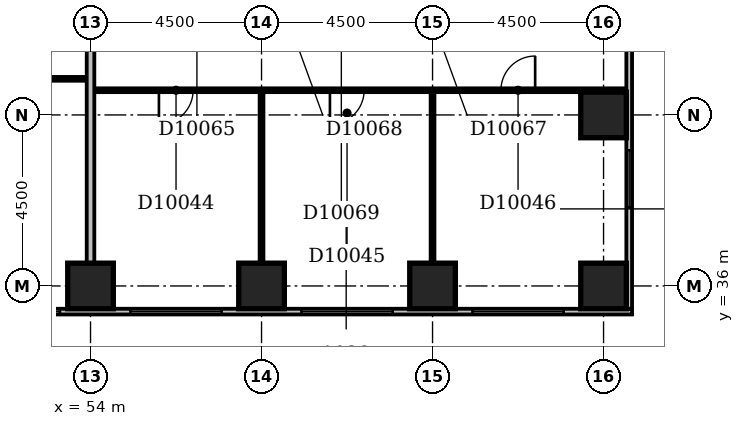
"""IFC4 building model, lengths in metres.
Left out: names, types, materials, properties, quantities, classifications, styles, units other than length and angle.
Written with IfcOpenShell. Run it as: python <this file> out.ifc"""

import sys

from ifc_helpers import new_model, si_unit, direction, frame, frame_2d, origin, origin_2d, place, context, subcontext, project, spatial, rectangle, extrude, element, fill, save


model = new_model("IFC4")
c1 = context("Model", 3, precision=1e-05, world=origin(), true_north=direction((0.0, 1.0)))
c2 = subcontext(c1, "Body", "Model", "MODEL_VIEW")
j1 = project(units=[si_unit("LENGTHUNIT", "METRE"), si_unit("PLANEANGLEUNIT", "RADIAN")], contexts=[c1])
p1 = place(None, origin())
s1 = spatial("IfcSite", under=j1, at=p1, CompositionType="ELEMENT")
p2 = place(p1, origin())
s2 = spatial("IfcBuilding", under=s1, at=p2, CompositionType="ELEMENT")
p3 = place(p2, frame((0.0, 0.0, 47.0)))
s3 = spatial("IfcBuildingStorey", under=s2, at=p3, CompositionType="ELEMENT", Elevation=47.0)
for number, where, z_axis, x_axis in (
    (1, (54.0, 36.0, -0.3), (0.0, 0.0, 1.0), (1.0, 0.0, 0.0)),
    (2, (58.5, 36.0, -0.3), (0.0, 0.0, 1.0), (1.0, 0.0, 0.0)),
    (3, (63.0, 36.0, -0.3), (0.0, 0.0, 1.0), (1.0, 0.0, 0.0)),
    (4, (67.5, 36.0, -0.3), (0.0, 0.0, 1.0), (1.0, 0.0, 0.0)),
    (5, (67.5, 40.5, -0.3), (0.0, 0.0, 1.0), (1.0, 0.0, 0.0)),
):
    element("IfcColumn", number, at=place(p3, frame(where, z_axis=z_axis, x_axis=x_axis)), inside=s3, PredefinedType="COLUMN", context=c2, shape_type="SweptSolid", body=[
        extrude(rectangle(XDim=1.2, YDim=1.2, at=origin_2d()), origin(), (0.0, 0.0, 1.0), 3.6),
    ])
p4 = place(p3, frame((23.1, 35.325, 0.0), z_axis=(0.0, 0.0, 1.0), x_axis=(1.0, 0.0, 0.0)))
e6 = element("IfcWall", 6, at=p4, inside=s3, PredefinedType="STANDARD", context=c2, shape_type="SweptSolid", body=[
    extrude(rectangle(XDim=45.15, YDim=0.15, at=frame_2d((22.575, 0.0))), origin(), (0.0, 0.0, 1.0), 2.7),
])
p5 = place(p4, frame((2.386, 0.0, 0.6)))
e7 = element("IfcOpeningElement", 7, at=p5, cuts=e6, PredefinedType="OPENING", context=c2, shape_type="SweptSolid", body=[
    extrude(rectangle(XDim=0.6, YDim=1.8, at=frame_2d((0.3, 0.9))), frame((0.0, 0.087, 0.0), z_axis=(0.0, -1.0, 0.0), x_axis=(1.0, 0.0, 0.0)), (0.0, 0.0, 1.0), 0.174),
])
p6 = place(p4, frame((4.95, 0.0, 0.6)))
e8 = element("IfcOpeningElement", 8, at=p6, cuts=e6, PredefinedType="OPENING", context=c2, shape_type="SweptSolid", body=[
    extrude(rectangle(XDim=2.4, YDim=1.8, at=frame_2d((1.2, 0.9))), frame((0.0, 0.087, 0.0), z_axis=(0.0, -1.0, 0.0), x_axis=(1.0, 0.0, 0.0)), (0.0, 0.0, 1.0), 0.174),
])
p7 = place(p4, frame((9.45, 0.0, 0.6)))
e9 = element("IfcOpeningElement", 9, at=p7, cuts=e6, PredefinedType="OPENING", context=c2, shape_type="SweptSolid", body=[
    extrude(rectangle(XDim=2.4, YDim=1.8, at=frame_2d((1.2, 0.9))), frame((0.0, 0.087, 0.0), z_axis=(0.0, -1.0, 0.0), x_axis=(1.0, 0.0, 0.0)), (0.0, 0.0, 1.0), 0.174),
])
p8 = place(p4, frame((13.95, 0.0, 0.6)))
e10 = element("IfcOpeningElement", 10, at=p8, cuts=e6, PredefinedType="OPENING", context=c2, shape_type="SweptSolid", body=[
    extrude(rectangle(XDim=2.4, YDim=1.8, at=frame_2d((1.2, 0.9))), frame((0.0, 0.087, 0.0), z_axis=(0.0, -1.0, 0.0), x_axis=(1.0, 0.0, 0.0)), (0.0, 0.0, 1.0), 0.174),
])
p9 = place(p4, frame((18.45, 0.0, 0.6)))
e11 = element("IfcOpeningElement", 11, at=p9, cuts=e6, PredefinedType="OPENING", context=c2, shape_type="SweptSolid", body=[
    extrude(rectangle(XDim=2.4, YDim=1.8, at=frame_2d((1.2, 0.9))), frame((0.0, 0.087, 0.0), z_axis=(0.0, -1.0, 0.0), x_axis=(1.0, 0.0, 0.0)), (0.0, 0.0, 1.0), 0.174),
])
p10 = place(p4, frame((22.83, 0.0, 0.6)))
e12 = element("IfcOpeningElement", 12, at=p10, cuts=e6, PredefinedType="OPENING", context=c2, shape_type="SweptSolid", body=[
    extrude(rectangle(XDim=1.5, YDim=1.8, at=frame_2d((0.75, 0.9))), frame((0.0, 0.087, 0.0), z_axis=(0.0, -1.0, 0.0), x_axis=(1.0, 0.0, 0.0)), (0.0, 0.0, 1.0), 0.174),
])
p11 = place(p4, frame((28.894, 0.0, 0.6)))
e13 = element("IfcOpeningElement", 13, at=p11, cuts=e6, PredefinedType="OPENING", context=c2, shape_type="SweptSolid", body=[
    extrude(rectangle(XDim=1.2, YDim=1.8, at=frame_2d((0.6, 0.9))), frame((0.0, 0.087, 0.0), z_axis=(0.0, -1.0, 0.0), x_axis=(1.0, 0.0, 0.0)), (0.0, 0.0, 1.0), 0.174),
])
p12 = place(p4, frame((31.95, 0.0, 0.6)))
e14 = element("IfcOpeningElement", 14, at=p12, cuts=e6, PredefinedType="OPENING", context=c2, shape_type="SweptSolid", body=[
    extrude(rectangle(XDim=2.4, YDim=1.8, at=frame_2d((1.2, 0.9))), frame((0.0, 0.087, 0.0), z_axis=(0.0, -1.0, 0.0), x_axis=(1.0, 0.0, 0.0)), (0.0, 0.0, 1.0), 0.174),
])
p13 = place(p4, frame((36.45, 0.0, 0.6)))
e15 = element("IfcOpeningElement", 15, at=p13, cuts=e6, PredefinedType="OPENING", context=c2, shape_type="SweptSolid", body=[
    extrude(rectangle(XDim=2.4, YDim=1.8, at=frame_2d((1.2, 0.9))), frame((0.0, 0.087, 0.0), z_axis=(0.0, -1.0, 0.0), x_axis=(1.0, 0.0, 0.0)), (0.0, 0.0, 1.0), 0.174),
])
p14 = place(p4, frame((40.95, 0.0, 0.6)))
e16 = element("IfcOpeningElement", 16, at=p14, cuts=e6, PredefinedType="OPENING", context=c2, shape_type="SweptSolid", body=[
    extrude(rectangle(XDim=2.4, YDim=1.8, at=frame_2d((1.2, 0.9))), frame((0.0, 0.087, 0.0), z_axis=(0.0, -1.0, 0.0), x_axis=(1.0, 0.0, 0.0)), (0.0, 0.0, 1.0), 0.174),
])
p15 = place(p3, frame((68.175, 35.4, 0.0), z_axis=(0.0, 0.0, 1.0), x_axis=(0.0, 1.0, 0.0)))
e17 = element("IfcWall", 17, at=p15, inside=s3, PredefinedType="STANDARD", context=c2, shape_type="SweptSolid", body=[
    extrude(rectangle(XDim=23.85, YDim=0.15, at=frame_2d((11.925, 0.0))), origin(), (0.0, 0.0, 1.0), 2.7),
])
p16 = place(p15, frame((2.67, 0.0, 0.6)))
e18 = element("IfcOpeningElement", 18, at=p16, cuts=e17, PredefinedType="OPENING", context=c2, shape_type="SweptSolid", body=[
    extrude(rectangle(XDim=1.5, YDim=1.8, at=frame_2d((0.75, 0.9))), frame((0.0, 0.087, 0.0), z_axis=(0.0, -1.0, 0.0), x_axis=(1.0, 0.0, 0.0)), (0.0, 0.0, 1.0), 0.174),
])
p17 = place(p15, frame((10.65, 0.0, 0.6)))
e19 = element("IfcOpeningElement", 19, at=p17, cuts=e17, PredefinedType="OPENING", context=c2, shape_type="SweptSolid", body=[
    extrude(rectangle(XDim=2.4, YDim=1.8, at=frame_2d((1.2, 0.9))), frame((0.0, 0.087, 0.0), z_axis=(0.0, -1.0, 0.0), x_axis=(1.0, 0.0, 0.0)), (0.0, 0.0, 1.0), 0.174),
])
p18 = place(p15, frame((19.5, 0.0, 0.6)))
e20 = element("IfcOpeningElement", 20, at=p18, cuts=e17, PredefinedType="OPENING", context=c2, shape_type="SweptSolid", body=[
    extrude(rectangle(XDim=2.1, YDim=1.8, at=frame_2d((1.05, 0.9))), frame((0.0, 0.087, 0.0), z_axis=(0.0, -1.0, 0.0), x_axis=(1.0, 0.0, 0.0)), (0.0, 0.0, 1.0), 0.174),
])
p19 = place(p3, frame((54.0, 36.6, 0.0), z_axis=(0.0, 0.0, 1.0), x_axis=(0.0, 1.0, 0.0)))
e21 = element("IfcWall", 21, at=p19, inside=s3, PredefinedType="PARTITIONING", context=c2, shape_type="SweptSolid", body=[
    extrude(rectangle(XDim=12.8, YDim=0.2, at=frame_2d((6.4, 0.0))), origin(), (0.0, 0.0, 1.0), 2.6),
])
p20 = place(p3, frame((58.5, 36.6, 0.0), z_axis=(0.0, 0.0, 1.0), x_axis=(0.0, 1.0, 0.0)))
e22 = element("IfcWall", 22, at=p20, inside=s3, PredefinedType="PARTITIONING", context=c2, shape_type="SweptSolid", body=[
    extrude(rectangle(XDim=4.5, YDim=0.1, at=frame_2d((2.25, 0.0))), origin(), (0.0, 0.0, 1.0), 3.3),
])
p21 = place(p3, frame((63.0, 36.6, 0.0), z_axis=(0.0, 0.0, 1.0), x_axis=(0.0, 1.0, 0.0)))
e23 = element("IfcWall", 23, at=p21, inside=s3, PredefinedType="PARTITIONING", context=c2, shape_type="SweptSolid", body=[
    extrude(rectangle(XDim=4.5, YDim=0.1, at=frame_2d((2.25, 0.0))), origin(), (0.0, 0.0, 1.0), 2.4),
])
p22 = place(p3, frame((54.1, 41.15, 0.0), z_axis=(0.0, 0.0, 1.0), x_axis=(1.0, 0.0, 0.0)))
e24 = element("IfcWall", 24, at=p22, inside=s3, PredefinedType="PARTITIONING", context=c2, shape_type="SweptSolid", body=[
    extrude(rectangle(XDim=14.0, YDim=0.1, at=frame_2d((7.0, 0.0))), origin(), (0.0, 0.0, 1.0), 3.3),
])
p23 = place(p22, frame((1.7, 0.0, 0.0)))
e25 = element("IfcOpeningElement", 25, at=p23, cuts=e24, PredefinedType="OPENING", context=c2, shape_type="SweptSolid", body=[
    extrude(rectangle(XDim=0.9, YDim=2.1, at=frame_2d((0.45, 1.05))), frame((0.0, 0.062, 0.0), z_axis=(0.0, -1.0, 0.0), x_axis=(1.0, 0.0, 0.0)), (0.0, 0.0, 1.0), 0.124),
])
p24 = place(p22, frame((6.2, 0.0, 0.0)))
e26 = element("IfcOpeningElement", 26, at=p24, cuts=e24, PredefinedType="OPENING", context=c2, shape_type="SweptSolid", body=[
    extrude(rectangle(XDim=0.9, YDim=2.1, at=frame_2d((0.45, 1.05))), frame((0.0, 0.062, 0.0), z_axis=(0.0, -1.0, 0.0), x_axis=(1.0, 0.0, 0.0)), (0.0, 0.0, 1.0), 0.124),
])
p25 = place(p22, frame((10.7, 0.0, 0.0)))
e27 = element("IfcOpeningElement", 27, at=p25, cuts=e24, PredefinedType="OPENING", context=c2, shape_type="SweptSolid", body=[
    extrude(rectangle(XDim=0.9, YDim=2.1, at=frame_2d((0.45, 1.05))), frame((0.0, 0.062, 0.0), z_axis=(0.0, -1.0, 0.0), x_axis=(1.0, 0.0, 0.0)), (0.0, 0.0, 1.0), 0.124),
])
p26 = place(p3, frame((40.6, 41.45, 0.0), z_axis=(0.0, 0.0, 1.0), x_axis=(1.0, 0.0, 0.0)))
e28 = element("IfcWall", 28, at=p26, inside=s3, PredefinedType="PARTITIONING", context=c2, shape_type="SweptSolid", body=[
    extrude(rectangle(XDim=13.3, YDim=0.1, at=frame_2d((6.65, 0.0))), origin(), (0.0, 0.0, 1.0), 3.3),
])
p27 = place(p26, frame((1.7, 0.0, 0.0)))
e29 = element("IfcOpeningElement", 29, at=p27, cuts=e28, PredefinedType="OPENING", context=c2, shape_type="SweptSolid", body=[
    extrude(rectangle(XDim=0.9, YDim=2.1, at=frame_2d((0.45, 1.05))), frame((0.0, 0.062, 0.0), z_axis=(0.0, -1.0, 0.0), x_axis=(1.0, 0.0, 0.0)), (0.0, 0.0, 1.0), 0.124),
])
p28 = place(p26, frame((6.2, 0.0, 0.0)))
e30 = element("IfcOpeningElement", 30, at=p28, cuts=e28, PredefinedType="OPENING", context=c2, shape_type="SweptSolid", body=[
    extrude(rectangle(XDim=0.9, YDim=2.1, at=frame_2d((0.45, 1.05))), frame((0.0, 0.062, 0.0), z_axis=(0.0, -1.0, 0.0), x_axis=(1.0, 0.0, 0.0)), (0.0, 0.0, 1.0), 0.124),
])
p29 = place(p26, frame((10.7, 0.0, 0.0)))
e31 = element("IfcOpeningElement", 31, at=p29, cuts=e28, PredefinedType="OPENING", context=c2, shape_type="SweptSolid", body=[
    extrude(rectangle(XDim=0.9, YDim=2.1, at=frame_2d((0.45, 1.05))), frame((0.0, 0.062, 0.0), z_axis=(0.0, -1.0, 0.0), x_axis=(1.0, 0.0, 0.0)), (0.0, 0.0, 1.0), 0.124),
])
p30 = place(p11, origin())
e32 = element("IfcWindow", 32, at=p30, inside=s3, PartitioningType="SINGLE_PANEL", PredefinedType="WINDOW", context=c2, shape_type="SweptSolid", body=[
    extrude(rectangle(XDim=1.2, YDim=1.8, at=frame_2d((0.6, 0.9))), frame((0.0, 0.03, 0.0), z_axis=(0.0, -1.0, 0.0), x_axis=(1.0, 0.0, 0.0)), (0.0, 0.0, 1.0), 0.06),
])
fill(e13, e32)
p31 = place(p12, origin())
e33 = element("IfcWindow", 33, at=p31, inside=s3, PartitioningType="SINGLE_PANEL", PredefinedType="WINDOW", context=c2, shape_type="SweptSolid", body=[
    extrude(rectangle(XDim=2.4, YDim=1.8, at=frame_2d((1.2, 0.9))), frame((0.0, 0.03, 0.0), z_axis=(0.0, -1.0, 0.0), x_axis=(1.0, 0.0, 0.0)), (0.0, 0.0, 1.0), 0.06),
])
fill(e14, e33)
p32 = place(p13, origin())
e34 = element("IfcWindow", 34, at=p32, inside=s3, PartitioningType="SINGLE_PANEL", PredefinedType="WINDOW", context=c2, shape_type="SweptSolid", body=[
    extrude(rectangle(XDim=2.4, YDim=1.8, at=frame_2d((1.2, 0.9))), frame((0.0, 0.03, 0.0), z_axis=(0.0, -1.0, 0.0), x_axis=(1.0, 0.0, 0.0)), (0.0, 0.0, 1.0), 0.06),
])
fill(e15, e34)
p33 = place(p14, origin())
e35 = element("IfcWindow", 35, at=p33, inside=s3, PartitioningType="SINGLE_PANEL", PredefinedType="WINDOW", context=c2, shape_type="SweptSolid", body=[
    extrude(rectangle(XDim=2.4, YDim=1.8, at=frame_2d((1.2, 0.9))), frame((0.0, 0.03, 0.0), z_axis=(0.0, -1.0, 0.0), x_axis=(1.0, 0.0, 0.0)), (0.0, 0.0, 1.0), 0.06),
])
fill(e16, e35)
p34 = place(p16, origin())
e36 = element("IfcWindow", 36, at=p34, inside=s3, PartitioningType="SINGLE_PANEL", PredefinedType="WINDOW", context=c2, shape_type="SweptSolid", body=[
    extrude(rectangle(XDim=1.5, YDim=1.8, at=frame_2d((0.75, 0.9))), frame((0.0, 0.03, 0.0), z_axis=(0.0, -1.0, 0.0), x_axis=(1.0, 0.0, 0.0)), (0.0, 0.0, 1.0), 0.06),
])
fill(e18, e36)
p35 = place(p23, frame((0.9, 0.0, 0.0), z_axis=(0.0, 0.0, 1.0), x_axis=(-1.0, 0.0, 0.0)))
e37 = element("IfcDoor", 37, at=p35, inside=s3, OperationType="SINGLE_SWING_RIGHT", PredefinedType="DOOR", context=c2, shape_type="SweptSolid", body=[
    extrude(rectangle(XDim=0.9, YDim=2.1, at=frame_2d((0.45, 1.05))), frame((0.0, 0.025, 0.0), z_axis=(0.0, -1.0, 0.0), x_axis=(1.0, 0.0, 0.0)), (0.0, 0.0, 1.0), 0.05),
])
fill(e25, e37)
p36 = place(p24, frame((0.9, 0.0, 0.0), z_axis=(0.0, 0.0, 1.0), x_axis=(-1.0, 0.0, 0.0)))
e38 = element("IfcDoor", 38, at=p36, inside=s3, OperationType="SINGLE_SWING_RIGHT", PredefinedType="DOOR", context=c2, shape_type="SweptSolid", body=[
    extrude(rectangle(XDim=0.9, YDim=2.1, at=frame_2d((0.45, 1.05))), frame((0.0, 0.025, 0.0), z_axis=(0.0, -1.0, 0.0), x_axis=(1.0, 0.0, 0.0)), (0.0, 0.0, 1.0), 0.05),
])
fill(e26, e38)
p37 = place(p25, frame((0.9, 0.0, 0.0), z_axis=(0.0, 0.0, 1.0), x_axis=(-1.0, 0.0, 0.0)))
e39 = element("IfcDoor", 39, at=p37, inside=s3, OperationType="SINGLE_SWING_LEFT", PredefinedType="DOOR", context=c2, shape_type="SweptSolid", body=[
    extrude(rectangle(XDim=0.9, YDim=2.1, at=frame_2d((0.45, 1.05))), frame((0.0, 0.025, 0.0), z_axis=(0.0, -1.0, 0.0), x_axis=(1.0, 0.0, 0.0)), (0.0, 0.0, 1.0), 0.05),
])
fill(e27, e39)
save(model, sys.argv[1])
